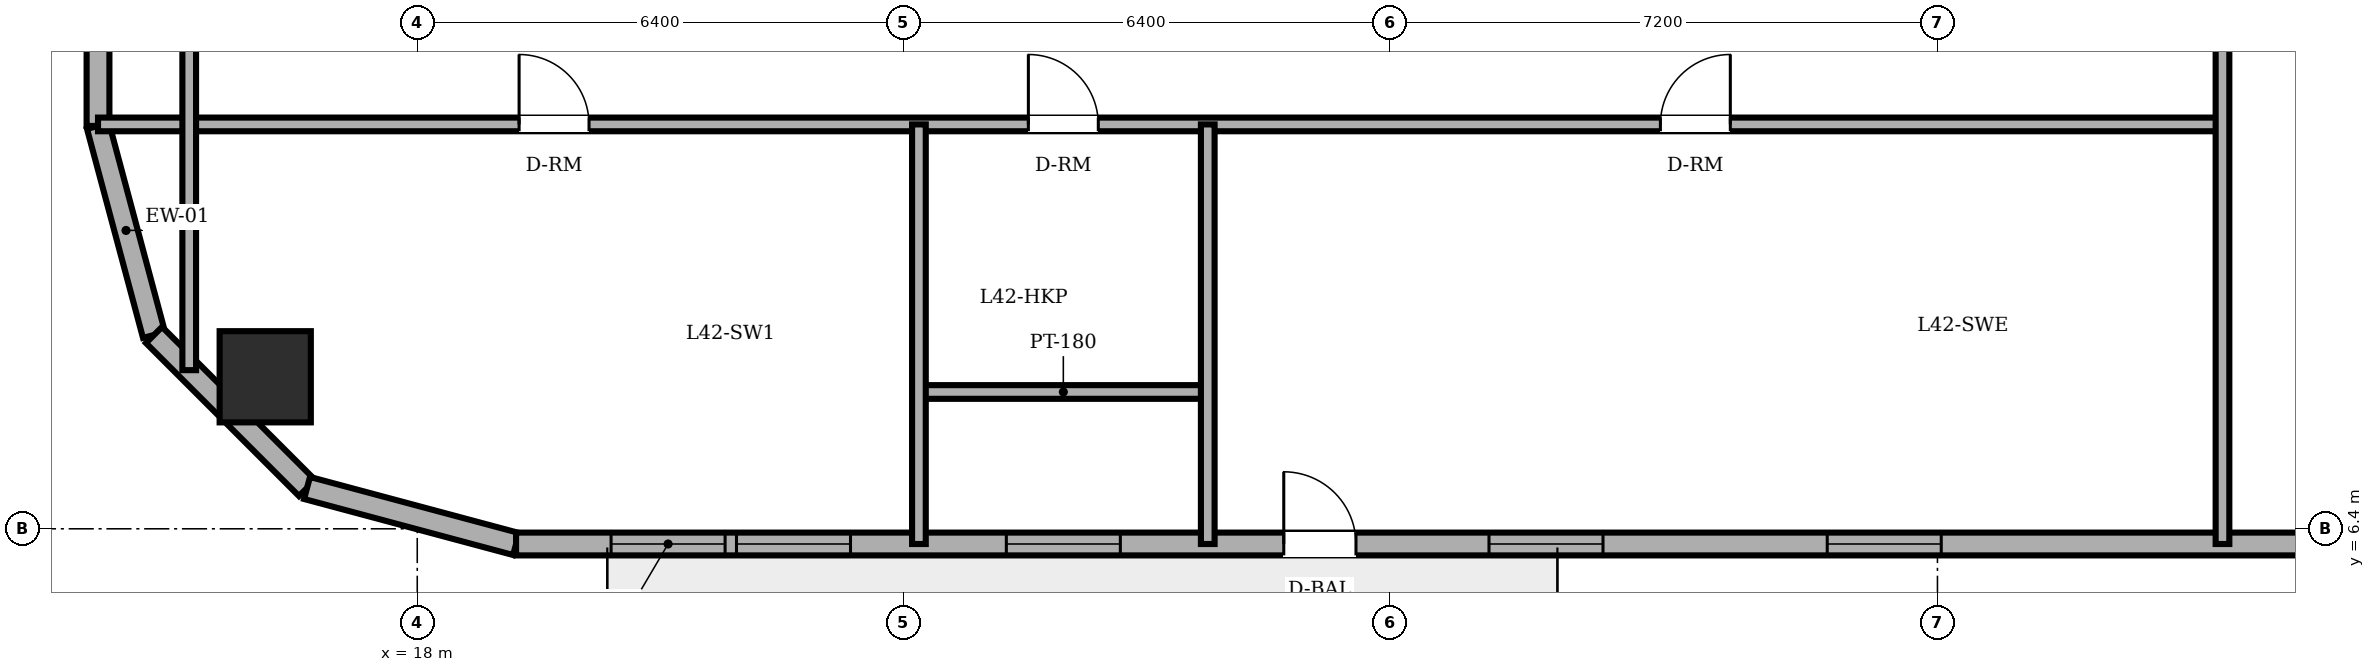
"""IFC4 building model, lengths in metres.
Left out: names, types, materials, properties, quantities, classifications, styles, units other than length and angle.
Written with IfcOpenShell. Run it as: python <this file> out.ifc"""

import sys

from ifc_helpers import new_model, si_unit, direction, frame, frame_2d, origin, origin_2d, place, context, subcontext, project, spatial, rectangle, circle, extrude, element, fill, save


model = new_model("IFC4")
c1 = context("Model", 3, precision=1e-05, world=origin(), true_north=direction((0.0, 1.0)))
c2 = subcontext(c1, "Body", "Model", "MODEL_VIEW")
j1 = project(units=[si_unit("LENGTHUNIT", "METRE"), si_unit("PLANEANGLEUNIT", "RADIAN")], contexts=[c1])
p1 = place(None, origin())
s1 = spatial("IfcSite", under=j1, at=p1, CompositionType="ELEMENT")
p2 = place(p1, origin())
s2 = spatial("IfcBuilding", under=s1, at=p2, CompositionType="ELEMENT")
p3 = place(p2, frame((0.0, 0.0, 161.8)))
s3 = spatial("IfcBuildingStorey", under=s2, at=p3, CompositionType="ELEMENT", Elevation=161.8)
p4 = place(p3, frame((16.0, 8.4, 0.0), z_axis=(0.0, 0.0, 1.0), x_axis=(1.0, 0.0, 0.0)))
e1 = element("IfcColumn", 1, at=p4, inside=s3, PredefinedType="COLUMN", context=c2, shape_type="SweptSolid", body=[
    extrude(circle(Radius=0.6, at=origin_2d()), origin(), (0.0, 0.0, 1.0), 3.6),
])
p5 = place(p3, frame((13.8, 11.7, 0.0), z_axis=(0.0, 0.0, 1.0), x_axis=(0.258884674387, -0.965908238586, 0.0)))
e2 = element("IfcWall", 2, at=p5, inside=s3, PredefinedType="SOLIDWALL", context=c2, shape_type="SweptSolid", body=[
    extrude(rectangle(XDim=2.847, YDim=0.3, at=frame_2d((1.424, 0.0))), origin(), (0.0, 0.0, 1.0), 3.4),
])
p6 = place(p3, frame((14.537, 8.95, 0.0), z_axis=(0.0, 0.0, 1.0), x_axis=(0.707106781187, -0.707106781187, 0.0)))
e3 = element("IfcWall", 3, at=p6, inside=s3, PredefinedType="SOLIDWALL", context=c2, shape_type="SweptSolid", body=[
    extrude(rectangle(XDim=2.847, YDim=0.3, at=frame_2d((1.423, 0.0))), origin(), (0.0, 0.0, 1.0), 3.4),
])
p7 = place(p3, frame((16.55, 6.937, 0.0), z_axis=(0.0, 0.0, 1.0), x_axis=(0.965908238586, -0.258884674387, 0.0)))
e4 = element("IfcWall", 4, at=p7, inside=s3, PredefinedType="SOLIDWALL", context=c2, shape_type="SweptSolid", body=[
    extrude(rectangle(XDim=2.847, YDim=0.3, at=frame_2d((1.424, 0.0))), origin(), (0.0, 0.0, 1.0), 3.4),
])
p8 = place(p3, frame((19.3, 6.2, 0.0), z_axis=(0.0, 0.0, 1.0), x_axis=(1.0, 0.0, 0.0)))
e5 = element("IfcWall", 5, at=p8, inside=s3, PredefinedType="SOLIDWALL", context=c2, shape_type="SweptSolid", body=[
    extrude(rectangle(XDim=30.282, YDim=0.3, at=frame_2d((15.141, 0.0))), origin(), (0.0, 0.0, 1.0), 3.4),
])
p9 = place(p8, frame((10.1, 0.0, 0.0)))
e6 = element("IfcOpeningElement", 6, at=p9, cuts=e5, PredefinedType="OPENING", context=c2, shape_type="SweptSolid", body=[
    extrude(rectangle(XDim=0.95, YDim=2.2, at=frame_2d((0.475, 1.1))), frame((0.0, 0.16, 0.0), z_axis=(0.0, -1.0, 0.0), x_axis=(1.0, 0.0, 0.0)), (0.0, 0.0, 1.0), 0.32),
])
p10 = place(p8, frame((1.25, 0.0, 0.85)))
e7 = element("IfcOpeningElement", 7, at=p10, cuts=e5, PredefinedType="OPENING", context=c2, shape_type="SweptSolid", body=[
    extrude(rectangle(XDim=1.5, YDim=1.55, at=frame_2d((0.75, 0.775))), frame((0.0, 0.16, 0.0), z_axis=(0.0, -1.0, 0.0), x_axis=(1.0, 0.0, 0.0)), (0.0, 0.0, 1.0), 0.32),
])
p11 = place(p8, frame((2.9, 0.0, 0.85)))
e8 = element("IfcOpeningElement", 8, at=p11, cuts=e5, PredefinedType="OPENING", context=c2, shape_type="SweptSolid", body=[
    extrude(rectangle(XDim=1.5, YDim=1.55, at=frame_2d((0.75, 0.775))), frame((0.0, 0.16, 0.0), z_axis=(0.0, -1.0, 0.0), x_axis=(1.0, 0.0, 0.0)), (0.0, 0.0, 1.0), 0.32),
])
p12 = place(p8, frame((6.45, 0.0, 0.85)))
e9 = element("IfcOpeningElement", 9, at=p12, cuts=e5, PredefinedType="OPENING", context=c2, shape_type="SweptSolid", body=[
    extrude(rectangle(XDim=1.5, YDim=1.55, at=frame_2d((0.75, 0.775))), frame((0.0, 0.16, 0.0), z_axis=(0.0, -1.0, 0.0), x_axis=(1.0, 0.0, 0.0)), (0.0, 0.0, 1.0), 0.32),
])
p13 = place(p8, frame((12.8, 0.0, 0.85)))
e10 = element("IfcOpeningElement", 10, at=p13, cuts=e5, PredefinedType="OPENING", context=c2, shape_type="SweptSolid", body=[
    extrude(rectangle(XDim=1.5, YDim=1.55, at=frame_2d((0.75, 0.775))), frame((0.0, 0.16, 0.0), z_axis=(0.0, -1.0, 0.0), x_axis=(1.0, 0.0, 0.0)), (0.0, 0.0, 1.0), 0.32),
])
p14 = place(p8, frame((17.25, 0.0, 0.85)))
e11 = element("IfcOpeningElement", 11, at=p14, cuts=e5, PredefinedType="OPENING", context=c2, shape_type="SweptSolid", body=[
    extrude(rectangle(XDim=1.5, YDim=1.55, at=frame_2d((0.75, 0.775))), frame((0.0, 0.16, 0.0), z_axis=(0.0, -1.0, 0.0), x_axis=(1.0, 0.0, 0.0)), (0.0, 0.0, 1.0), 0.32),
])
p15 = place(p8, frame((24.194, 0.0, 0.85)))
e12 = element("IfcOpeningElement", 12, at=p15, cuts=e5, PredefinedType="OPENING", context=c2, shape_type="SweptSolid", body=[
    extrude(rectangle(XDim=1.5, YDim=1.55, at=frame_2d((0.75, 0.775))), frame((0.0, 0.16, 0.0), z_axis=(0.0, -1.0, 0.0), x_axis=(1.0, 0.0, 0.0)), (0.0, 0.0, 1.0), 0.32),
])
p16 = place(p8, frame((26.688, 0.0, 0.85)))
e13 = element("IfcOpeningElement", 13, at=p16, cuts=e5, PredefinedType="OPENING", context=c2, shape_type="SweptSolid", body=[
    extrude(rectangle(XDim=1.5, YDim=1.55, at=frame_2d((0.75, 0.775))), frame((0.0, 0.16, 0.0), z_axis=(0.0, -1.0, 0.0), x_axis=(1.0, 0.0, 0.0)), (0.0, 0.0, 1.0), 0.32),
])
p17 = place(p3, frame((13.8, 36.3, 0.0), z_axis=(0.0, 0.0, 1.0), x_axis=(0.0, -1.0, 0.0)))
e14 = element("IfcWall", 14, at=p17, inside=s3, PredefinedType="SOLIDWALL", context=c2, shape_type="SweptSolid", body=[
    extrude(rectangle(XDim=24.6, YDim=0.3, at=frame_2d((12.3, 0.0))), origin(), (0.0, 0.0, 1.0), 3.4),
])
p18 = place(p17, frame((8.277, 0.0, 0.85)))
e15 = element("IfcOpeningElement", 15, at=p18, cuts=e14, PredefinedType="OPENING", context=c2, shape_type="SweptSolid", body=[
    extrude(rectangle(XDim=1.5, YDim=1.55, at=frame_2d((0.75, 0.775))), frame((0.0, 0.16, 0.0), z_axis=(0.0, -1.0, 0.0), x_axis=(1.0, 0.0, 0.0)), (0.0, 0.0, 1.0), 0.32),
])
p19 = place(p17, frame((14.823, 0.0, 0.85)))
e16 = element("IfcOpeningElement", 16, at=p19, cuts=e14, PredefinedType="OPENING", context=c2, shape_type="SweptSolid", body=[
    extrude(rectangle(XDim=1.5, YDim=1.55, at=frame_2d((0.75, 0.775))), frame((0.0, 0.16, 0.0), z_axis=(0.0, -1.0, 0.0), x_axis=(1.0, 0.0, 0.0)), (0.0, 0.0, 1.0), 0.32),
])
p20 = place(p3, frame((24.6, 8.2, 0.0), z_axis=(0.0, 0.0, 1.0), x_axis=(1.0, 0.0, 0.0)))
e17 = element("IfcWall", 17, at=p20, inside=s3, PredefinedType="PARTITIONING", context=c2, shape_type="SweptSolid", body=[
    extrude(rectangle(XDim=3.8, YDim=0.18, at=frame_2d((1.9, 0.0))), origin(), (0.0, 0.0, 1.0), 2.882),
])
p21 = place(p3, frame((13.8, 11.72, 0.0), z_axis=(0.0, 0.0, 1.0), x_axis=(1.0, 0.0, 0.0)))
e18 = element("IfcWall", 18, at=p21, inside=s3, PredefinedType="PARTITIONING", context=c2, shape_type="SweptSolid", body=[
    extrude(rectangle(XDim=27.95, YDim=0.18, at=frame_2d((13.975, 0.0))), origin(), (0.0, 0.0, 1.0), 3.4),
])
p22 = place(p21, frame((12.24, 0.0, 0.0)))
e19 = element("IfcOpeningElement", 19, at=p22, cuts=e18, PredefinedType="OPENING", context=c2, shape_type="SweptSolid", body=[
    extrude(rectangle(XDim=0.92, YDim=2.1, at=frame_2d((0.46, 1.05))), frame((0.0, 0.1, 0.0), z_axis=(0.0, -1.0, 0.0), x_axis=(1.0, 0.0, 0.0)), (0.0, 0.0, 1.0), 0.2),
])
p23 = place(p21, frame((5.54, 0.0, 0.0)))
e20 = element("IfcOpeningElement", 20, at=p23, cuts=e18, PredefinedType="OPENING", context=c2, shape_type="SweptSolid", body=[
    extrude(rectangle(XDim=0.92, YDim=2.1, at=frame_2d((0.46, 1.05))), frame((0.0, 0.1, 0.0), z_axis=(0.0, -1.0, 0.0), x_axis=(1.0, 0.0, 0.0)), (0.0, 0.0, 1.0), 0.2),
])
p24 = place(p21, frame((20.555, 0.0, 0.0)))
e21 = element("IfcOpeningElement", 21, at=p24, cuts=e18, PredefinedType="OPENING", context=c2, shape_type="SweptSolid", body=[
    extrude(rectangle(XDim=0.92, YDim=2.1, at=frame_2d((0.46, 1.05))), frame((0.0, 0.1, 0.0), z_axis=(0.0, -1.0, 0.0), x_axis=(1.0, 0.0, 0.0)), (0.0, 0.0, 1.0), 0.2),
])
p25 = place(p3, frame((15.0, 8.487, 0.0), z_axis=(0.0, 0.0, 1.0), x_axis=(0.0, 1.0, 0.0)))
e22 = element("IfcWall", 22, at=p25, inside=s3, PredefinedType="PARTITIONING", context=c2, shape_type="SweptSolid", body=[
    extrude(rectangle(XDim=5.693, YDim=0.18, at=frame_2d((2.846, 0.0))), origin(), (0.0, 0.0, 1.0), 3.4),
])
for number, where, z_axis, x_axis in (
    (23, (24.6, 6.2, 0.0), (0.0, 0.0, 1.0), (0.0, 1.0, 0.0)),
    (24, (28.4, 6.2, 0.0), (0.0, 0.0, 1.0), (0.0, 1.0, 0.0)),
):
    element("IfcWall", number, at=place(p3, frame(where, z_axis=z_axis, x_axis=x_axis)), inside=s3, PredefinedType="PARTITIONING", context=c2, shape_type="SweptSolid", body=[
        extrude(rectangle(XDim=5.52, YDim=0.18, at=frame_2d((2.76, 0.0))), origin(), (0.0, 0.0, 1.0), 3.4),
    ])
p26 = place(p3, frame((41.75, 6.2, 0.0), z_axis=(0.0, 0.0, 1.0), x_axis=(0.0, 1.0, 0.0)))
e25 = element("IfcWall", 25, at=p26, inside=s3, PredefinedType="PARTITIONING", context=c2, shape_type="SweptSolid", body=[
    extrude(rectangle(XDim=16.62, YDim=0.18, at=frame_2d((8.31, 0.0))), origin(), (0.0, 0.0, 1.0), 3.4),
])
p27 = place(p26, frame((10.35, 0.0, 0.0)))
e26 = element("IfcOpeningElement", 26, at=p27, cuts=e25, PredefinedType="OPENING", context=c2, shape_type="SweptSolid", body=[
    extrude(rectangle(XDim=0.92, YDim=2.1, at=frame_2d((0.46, 1.05))), frame((0.0, 0.1, 0.0), z_axis=(0.0, -1.0, 0.0), x_axis=(1.0, 0.0, 0.0)), (0.0, 0.0, 1.0), 0.2),
])
p28 = place(p9, origin())
e27 = element("IfcDoor", 27, at=p28, inside=s3, OperationType="SINGLE_SWING_LEFT", PredefinedType="DOOR", context=c2, shape_type="SweptSolid", body=[
    extrude(rectangle(XDim=0.95, YDim=2.2, at=frame_2d((0.475, 1.1))), frame((0.0, 0.025, 0.0), z_axis=(0.0, -1.0, 0.0), x_axis=(1.0, 0.0, 0.0)), (0.0, 0.0, 1.0), 0.05),
])
fill(e6, e27)
p29 = place(p10, origin())
e28 = element("IfcWindow", 28, at=p29, inside=s3, PartitioningType="DOUBLE_PANEL_VERTICAL", PredefinedType="WINDOW", context=c2, shape_type="SweptSolid", body=[
    extrude(rectangle(XDim=1.5, YDim=1.55, at=frame_2d((0.75, 0.775))), frame((0.0, 0.03, 0.0), z_axis=(0.0, -1.0, 0.0), x_axis=(1.0, 0.0, 0.0)), (0.0, 0.0, 1.0), 0.06),
])
fill(e7, e28)
p30 = place(p11, origin())
e29 = element("IfcWindow", 29, at=p30, inside=s3, PartitioningType="DOUBLE_PANEL_VERTICAL", PredefinedType="WINDOW", context=c2, shape_type="SweptSolid", body=[
    extrude(rectangle(XDim=1.5, YDim=1.55, at=frame_2d((0.75, 0.775))), frame((0.0, 0.03, 0.0), z_axis=(0.0, -1.0, 0.0), x_axis=(1.0, 0.0, 0.0)), (0.0, 0.0, 1.0), 0.06),
])
fill(e8, e29)
p31 = place(p12, origin())
e30 = element("IfcWindow", 30, at=p31, inside=s3, PartitioningType="DOUBLE_PANEL_VERTICAL", PredefinedType="WINDOW", context=c2, shape_type="SweptSolid", body=[
    extrude(rectangle(XDim=1.5, YDim=1.55, at=frame_2d((0.75, 0.775))), frame((0.0, 0.03, 0.0), z_axis=(0.0, -1.0, 0.0), x_axis=(1.0, 0.0, 0.0)), (0.0, 0.0, 1.0), 0.06),
])
fill(e9, e30)
p32 = place(p13, origin())
e31 = element("IfcWindow", 31, at=p32, inside=s3, PartitioningType="DOUBLE_PANEL_VERTICAL", PredefinedType="WINDOW", context=c2, shape_type="SweptSolid", body=[
    extrude(rectangle(XDim=1.5, YDim=1.55, at=frame_2d((0.75, 0.775))), frame((0.0, 0.03, 0.0), z_axis=(0.0, -1.0, 0.0), x_axis=(1.0, 0.0, 0.0)), (0.0, 0.0, 1.0), 0.06),
])
fill(e10, e31)
p33 = place(p14, origin())
e32 = element("IfcWindow", 32, at=p33, inside=s3, PartitioningType="DOUBLE_PANEL_VERTICAL", PredefinedType="WINDOW", context=c2, shape_type="SweptSolid", body=[
    extrude(rectangle(XDim=1.5, YDim=1.55, at=frame_2d((0.75, 0.775))), frame((0.0, 0.03, 0.0), z_axis=(0.0, -1.0, 0.0), x_axis=(1.0, 0.0, 0.0)), (0.0, 0.0, 1.0), 0.06),
])
fill(e11, e32)
p34 = place(p22, origin())
e33 = element("IfcDoor", 33, at=p34, inside=s3, OperationType="SINGLE_SWING_LEFT", PredefinedType="DOOR", context=c2, shape_type="SweptSolid", body=[
    extrude(rectangle(XDim=0.92, YDim=2.1, at=frame_2d((0.46, 1.05))), frame((0.0, 0.025, 0.0), z_axis=(0.0, -1.0, 0.0), x_axis=(1.0, 0.0, 0.0)), (0.0, 0.0, 1.0), 0.05),
])
fill(e19, e33)
p35 = place(p23, origin())
e34 = element("IfcDoor", 34, at=p35, inside=s3, OperationType="SINGLE_SWING_LEFT", PredefinedType="DOOR", context=c2, shape_type="SweptSolid", body=[
    extrude(rectangle(XDim=0.92, YDim=2.1, at=frame_2d((0.46, 1.05))), frame((0.0, 0.025, 0.0), z_axis=(0.0, -1.0, 0.0), x_axis=(1.0, 0.0, 0.0)), (0.0, 0.0, 1.0), 0.05),
])
fill(e20, e34)
p36 = place(p24, origin())
e35 = element("IfcDoor", 35, at=p36, inside=s3, OperationType="SINGLE_SWING_RIGHT", PredefinedType="DOOR", context=c2, shape_type="SweptSolid", body=[
    extrude(rectangle(XDim=0.92, YDim=2.1, at=frame_2d((0.46, 1.05))), frame((0.0, 0.025, 0.0), z_axis=(0.0, -1.0, 0.0), x_axis=(1.0, 0.0, 0.0)), (0.0, 0.0, 1.0), 0.05),
])
fill(e21, e35)
save(model, sys.argv[1])
